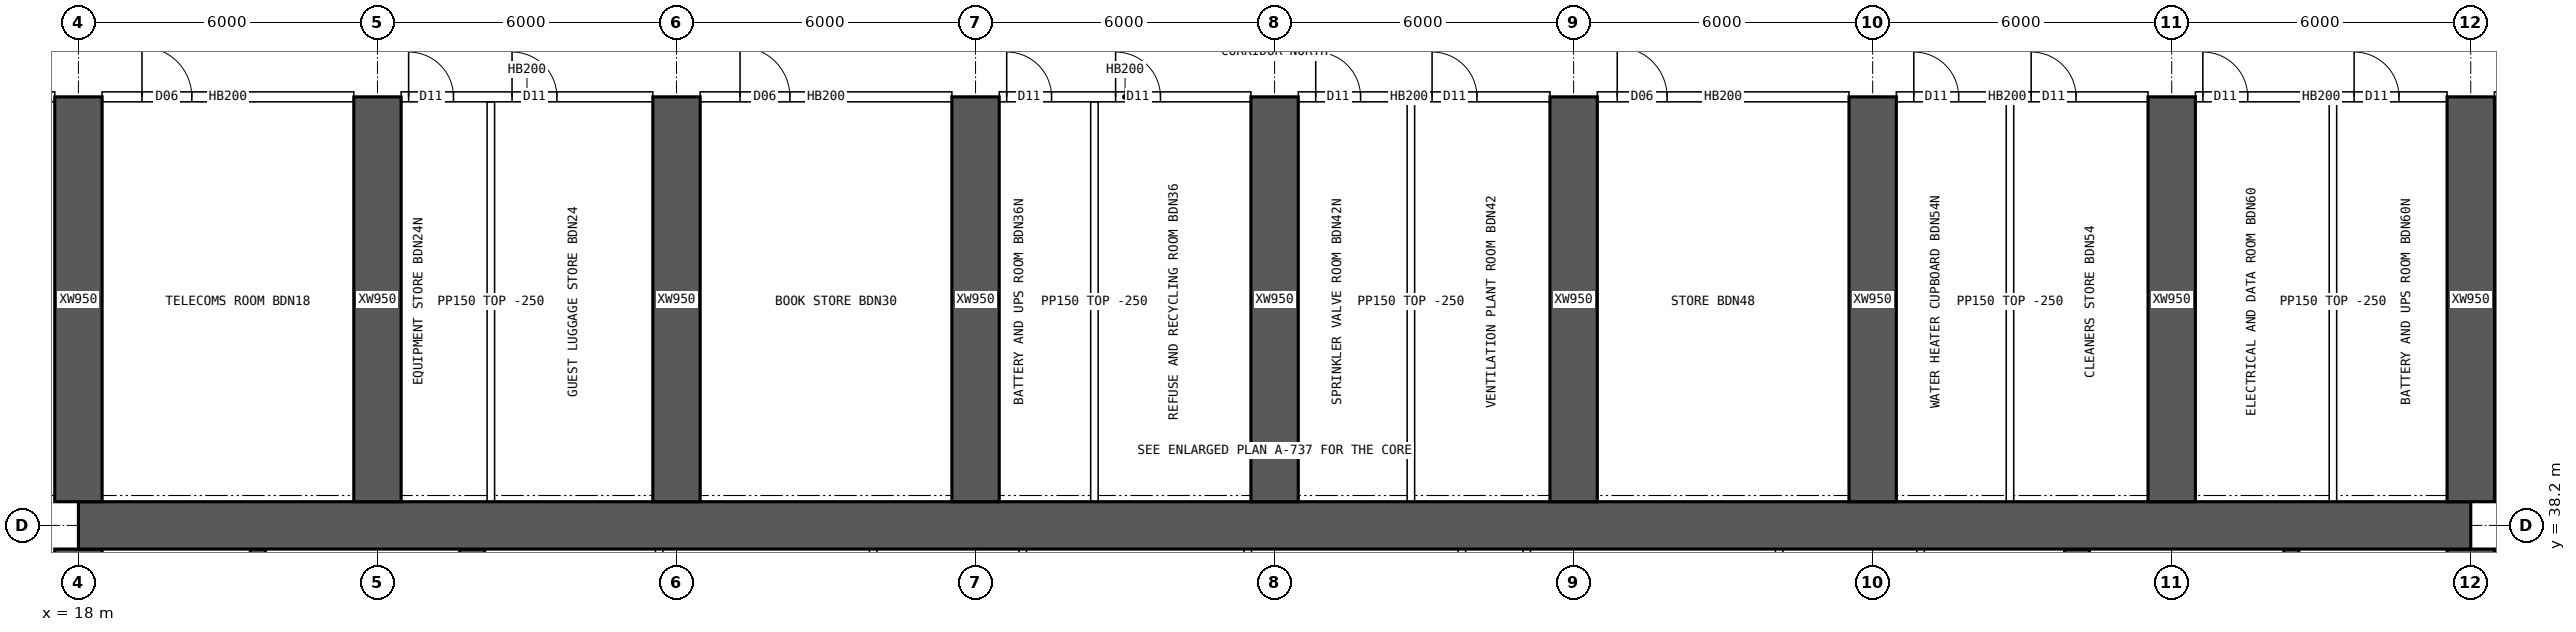
"""IFC4 building model, lengths in metres.
Left out: names, types, materials, properties, quantities, classifications, styles, units other than length and angle.
Written with IfcOpenShell. Run it as: python <this file> out.ifc"""

import sys

from ifc_helpers import new_model, si_unit, direction, frame, frame_2d, origin, place, context, subcontext, project, spatial, rectangle, extrude, element, fill, save


model = new_model("IFC4")
c1 = context("Model", 3, precision=1e-05, world=origin(), true_north=direction((0.0, 1.0)))
c2 = subcontext(c1, "Body", "Model", "MODEL_VIEW")
j1 = project(units=[si_unit("LENGTHUNIT", "METRE"), si_unit("PLANEANGLEUNIT", "RADIAN")], contexts=[c1])
p1 = place(None, origin())
s1 = spatial("IfcSite", under=j1, at=p1, CompositionType="ELEMENT")
p2 = place(p1, origin())
s2 = spatial("IfcBuilding", under=s1, at=p2, CompositionType="ELEMENT")
p3 = place(p2, frame((0.0, 0.0, 140.35)))
s3 = spatial("IfcBuildingStorey", under=s2, at=p3, CompositionType="ELEMENT", Elevation=140.35)
p4 = place(p3, frame((18.0, 38.2, 0.0), z_axis=(0.0, 0.0, 1.0), x_axis=(1.0, 0.0, 0.0)))
e1 = element("IfcWall", 1, at=p4, inside=s3, PredefinedType="SHEAR", context=c2, shape_type="SweptSolid", body=[
    extrude(rectangle(XDim=48.0, YDim=0.95, at=frame_2d((24.0, 0.0))), origin(), (0.0, 0.0, 1.0), 4.5),
])
p5 = place(p3, frame((18.0, 26.275, 0.0), z_axis=(0.0, 0.0, 1.0), x_axis=(0.0, 1.0, 0.0)))
e2 = element("IfcWall", 2, at=p5, inside=s3, PredefinedType="SHEAR", context=c2, shape_type="SweptSolid", body=[
    extrude(rectangle(XDim=11.45, YDim=0.95, at=frame_2d((5.725, 0.0))), origin(), (0.0, 0.0, 1.0), 4.5),
])
p6 = place(p5, frame((5.025, 0.0, 0.0)))
e3 = element("IfcOpeningElement", 3, at=p6, cuts=e2, PredefinedType="OPENING", context=c2, shape_type="SweptSolid", body=[
    extrude(rectangle(XDim=1.2, YDim=2.1, at=frame_2d((0.6, 1.05))), frame((0.0, 0.485, 0.0), z_axis=(0.0, -1.0, 0.0), x_axis=(1.0, 0.0, 0.0)), (0.0, 0.0, 1.0), 0.97),
])
p7 = place(p3, frame((66.0, 26.275, 0.0), z_axis=(0.0, 0.0, 1.0), x_axis=(0.0, 1.0, 0.0)))
e4 = element("IfcWall", 4, at=p7, inside=s3, PredefinedType="SHEAR", context=c2, shape_type="SweptSolid", body=[
    extrude(rectangle(XDim=11.45, YDim=0.95, at=frame_2d((5.725, 0.0))), origin(), (0.0, 0.0, 1.0), 4.5),
])
p8 = place(p7, frame((5.025, 0.0, 0.0)))
e5 = element("IfcOpeningElement", 5, at=p8, cuts=e4, PredefinedType="OPENING", context=c2, shape_type="SweptSolid", body=[
    extrude(rectangle(XDim=1.2, YDim=2.1, at=frame_2d((0.6, 1.05))), frame((0.0, 0.485, 0.0), z_axis=(0.0, -1.0, 0.0), x_axis=(1.0, 0.0, 0.0)), (0.0, 0.0, 1.0), 0.97),
])
for number, where, z_axis, x_axis in (
    (6, (21.6, 34.75, 0.0), (0.0, 0.0, 1.0), (0.0, 1.0, 0.0)),
    (7, (62.4, 34.75, 0.0), (0.0, 0.0, 1.0), (0.0, 1.0, 0.0)),
):
    element("IfcWall", number, at=place(p3, frame(where, z_axis=z_axis, x_axis=x_axis)), inside=s3, PredefinedType="SHEAR", context=c2, shape_type="SweptSolid", body=[
        extrude(rectangle(XDim=2.975, YDim=0.3, at=frame_2d((1.488, 0.0))), origin(), (0.0, 0.0, 1.0), 4.5),
    ])
for number, where, z_axis, x_axis in (
    (8, (25.9, 34.75, 0.0), (0.0, 0.0, 1.0), (0.0, 1.0, 0.0)),
    (9, (58.1, 34.75, 0.0), (0.0, 0.0, 1.0), (0.0, 1.0, 0.0)),
):
    element("IfcWall", number, at=place(p3, frame(where, z_axis=z_axis, x_axis=x_axis)), inside=s3, PredefinedType="SHEAR", context=c2, shape_type="SweptSolid", body=[
        extrude(rectangle(XDim=2.975, YDim=0.5, at=frame_2d((1.488, 0.0))), origin(), (0.0, 0.0, 1.0), 4.5),
    ])
for number, where, z_axis, x_axis in (
    (10, (18.0, 38.675, 0.0), (0.0, 0.0, 1.0), (0.0, 1.0, 0.0)),
    (11, (24.0, 38.675, 0.0), (0.0, 0.0, 1.0), (0.0, 1.0, 0.0)),
    (12, (30.0, 38.675, 0.0), (0.0, 0.0, 1.0), (0.0, 1.0, 0.0)),
    (13, (36.0, 38.675, 0.0), (0.0, 0.0, 1.0), (0.0, 1.0, 0.0)),
    (14, (42.0, 38.675, 0.0), (0.0, 0.0, 1.0), (0.0, 1.0, 0.0)),
    (15, (48.0, 38.675, 0.0), (0.0, 0.0, 1.0), (0.0, 1.0, 0.0)),
    (16, (54.0, 38.675, 0.0), (0.0, 0.0, 1.0), (0.0, 1.0, 0.0)),
    (17, (60.0, 38.675, 0.0), (0.0, 0.0, 1.0), (0.0, 1.0, 0.0)),
    (18, (66.0, 38.675, 0.0), (0.0, 0.0, 1.0), (0.0, 1.0, 0.0)),
):
    element("IfcWall", number, at=place(p3, frame(where, z_axis=z_axis, x_axis=x_axis)), inside=s3, PredefinedType="SHEAR", context=c2, shape_type="SweptSolid", body=[
        extrude(rectangle(XDim=8.125, YDim=0.95, at=frame_2d((4.062, 0.0))), origin(), (0.0, 0.0, 1.0), 4.5),
    ])
for number, where, z_axis, x_axis in (
    (19, (29.651, 34.75, 0.0), (0.0, 0.0, 1.0), (0.0, 1.0, 0.0)),
    (20, (33.946, 34.75, 0.0), (0.0, 0.0, 1.0), (0.0, 1.0, 0.0)),
    (21, (36.946, 34.75, 0.0), (0.0, 0.0, 1.0), (0.0, 1.0, 0.0)),
    (22, (41.463, 34.75, 0.0), (0.0, 0.0, 1.0), (0.0, 1.0, 0.0)),
    (23, (45.758, 34.75, 0.0), (0.0, 0.0, 1.0), (0.0, 1.0, 0.0)),
    (24, (47.058, 34.75, 0.0), (0.0, 0.0, 1.0), (0.0, 1.0, 0.0)),
    (25, (52.124, 34.75, 0.0), (0.0, 0.0, 1.0), (0.0, 1.0, 0.0)),
    (26, (54.961, 34.75, 0.0), (0.0, 0.0, 1.0), (0.0, 1.0, 0.0)),
):
    element("IfcWall", number, at=place(p3, frame(where, z_axis=z_axis, x_axis=x_axis)), inside=s3, PredefinedType="SOLIDWALL", context=c2, shape_type="SweptSolid", body=[
        extrude(rectangle(XDim=2.975, YDim=0.15, at=frame_2d((1.488, 0.0))), origin(), (0.0, 0.0, 1.0), 4.25),
    ])
p9 = place(p3, frame((15.6, 46.8, 0.0), z_axis=(0.0, 0.0, 1.0), x_axis=(1.0, 0.0, 0.0)))
e27 = element("IfcWall", 27, at=p9, inside=s3, PredefinedType="SOLIDWALL", context=c2, shape_type="SweptSolid", body=[
    extrude(rectangle(XDim=1.925, YDim=0.2, at=frame_2d((0.962, 0.0))), origin(), (0.0, 0.0, 1.0), 4.25),
])
p10 = place(p9, frame((0.625, 0.0, 0.0)))
e28 = element("IfcOpeningElement", 28, at=p10, cuts=e27, PredefinedType="OPENING", context=c2, shape_type="SweptSolid", body=[
    extrude(rectangle(XDim=1.2, YDim=2.1, at=frame_2d((0.6, 1.05))), frame((0.0, 0.11, 0.0), z_axis=(0.0, -1.0, 0.0), x_axis=(1.0, 0.0, 0.0)), (0.0, 0.0, 1.0), 0.22),
])
p11 = place(p3, frame((18.475, 46.8, 0.0), z_axis=(0.0, 0.0, 1.0), x_axis=(1.0, 0.0, 0.0)))
e29 = element("IfcWall", 29, at=p11, inside=s3, PredefinedType="SOLIDWALL", context=c2, shape_type="SweptSolid", body=[
    extrude(rectangle(XDim=5.05, YDim=0.2, at=frame_2d((2.525, 0.0))), origin(), (0.0, 0.0, 1.0), 4.25),
])
p12 = place(p11, frame((0.8, 0.0, 0.0)))
e30 = element("IfcOpeningElement", 30, at=p12, cuts=e29, PredefinedType="OPENING", context=c2, shape_type="SweptSolid", body=[
    extrude(rectangle(XDim=1.0, YDim=2.1, at=frame_2d((0.5, 1.05))), frame((0.0, 0.11, 0.0), z_axis=(0.0, -1.0, 0.0), x_axis=(1.0, 0.0, 0.0)), (0.0, 0.0, 1.0), 0.22),
])
p13 = place(p3, frame((24.475, 46.8, 0.0), z_axis=(0.0, 0.0, 1.0), x_axis=(1.0, 0.0, 0.0)))
e31 = element("IfcWall", 31, at=p13, inside=s3, PredefinedType="SOLIDWALL", context=c2, shape_type="SweptSolid", body=[
    extrude(rectangle(XDim=5.05, YDim=0.2, at=frame_2d((2.525, 0.0))), origin(), (0.0, 0.0, 1.0), 4.25),
])
p14 = place(p13, frame((0.15, 0.0, 0.0)))
e32 = element("IfcOpeningElement", 32, at=p14, cuts=e31, PredefinedType="OPENING", context=c2, shape_type="SweptSolid", body=[
    extrude(rectangle(XDim=0.9, YDim=2.1, at=frame_2d((0.45, 1.05))), frame((0.0, 0.11, 0.0), z_axis=(0.0, -1.0, 0.0), x_axis=(1.0, 0.0, 0.0)), (0.0, 0.0, 1.0), 0.22),
])
p15 = place(p13, frame((2.225, 0.0, 0.0)))
e33 = element("IfcOpeningElement", 33, at=p15, cuts=e31, PredefinedType="OPENING", context=c2, shape_type="SweptSolid", body=[
    extrude(rectangle(XDim=0.9, YDim=2.1, at=frame_2d((0.45, 1.05))), frame((0.0, 0.11, 0.0), z_axis=(0.0, -1.0, 0.0), x_axis=(1.0, 0.0, 0.0)), (0.0, 0.0, 1.0), 0.22),
])
p16 = place(p3, frame((30.475, 46.8, 0.0), z_axis=(0.0, 0.0, 1.0), x_axis=(1.0, 0.0, 0.0)))
e34 = element("IfcWall", 34, at=p16, inside=s3, PredefinedType="SOLIDWALL", context=c2, shape_type="SweptSolid", body=[
    extrude(rectangle(XDim=5.05, YDim=0.2, at=frame_2d((2.525, 0.0))), origin(), (0.0, 0.0, 1.0), 4.25),
])
p17 = place(p16, frame((0.8, 0.0, 0.0)))
e35 = element("IfcOpeningElement", 35, at=p17, cuts=e34, PredefinedType="OPENING", context=c2, shape_type="SweptSolid", body=[
    extrude(rectangle(XDim=1.0, YDim=2.1, at=frame_2d((0.5, 1.05))), frame((0.0, 0.11, 0.0), z_axis=(0.0, -1.0, 0.0), x_axis=(1.0, 0.0, 0.0)), (0.0, 0.0, 1.0), 0.22),
])
p18 = place(p3, frame((36.475, 46.8, 0.0), z_axis=(0.0, 0.0, 1.0), x_axis=(1.0, 0.0, 0.0)))
e36 = element("IfcWall", 36, at=p18, inside=s3, PredefinedType="SOLIDWALL", context=c2, shape_type="SweptSolid", body=[
    extrude(rectangle(XDim=5.05, YDim=0.2, at=frame_2d((2.525, 0.0))), origin(), (0.0, 0.0, 1.0), 4.25),
])
p19 = place(p18, frame((0.15, 0.0, 0.0)))
e37 = element("IfcOpeningElement", 37, at=p19, cuts=e36, PredefinedType="OPENING", context=c2, shape_type="SweptSolid", body=[
    extrude(rectangle(XDim=0.9, YDim=2.1, at=frame_2d((0.45, 1.05))), frame((0.0, 0.11, 0.0), z_axis=(0.0, -1.0, 0.0), x_axis=(1.0, 0.0, 0.0)), (0.0, 0.0, 1.0), 0.22),
])
p20 = place(p18, frame((2.335, 0.0, 0.0)))
e38 = element("IfcOpeningElement", 38, at=p20, cuts=e36, PredefinedType="OPENING", context=c2, shape_type="SweptSolid", body=[
    extrude(rectangle(XDim=0.9, YDim=2.1, at=frame_2d((0.45, 1.05))), frame((0.0, 0.11, 0.0), z_axis=(0.0, -1.0, 0.0), x_axis=(1.0, 0.0, 0.0)), (0.0, 0.0, 1.0), 0.22),
])
p21 = place(p3, frame((42.475, 46.8, 0.0), z_axis=(0.0, 0.0, 1.0), x_axis=(1.0, 0.0, 0.0)))
e39 = element("IfcWall", 39, at=p21, inside=s3, PredefinedType="SOLIDWALL", context=c2, shape_type="SweptSolid", body=[
    extrude(rectangle(XDim=5.05, YDim=0.2, at=frame_2d((2.525, 0.0))), origin(), (0.0, 0.0, 1.0), 4.25),
])
p22 = place(p21, frame((0.35, 0.0, 0.0)))
e40 = element("IfcOpeningElement", 40, at=p22, cuts=e39, PredefinedType="OPENING", context=c2, shape_type="SweptSolid", body=[
    extrude(rectangle(XDim=0.9, YDim=2.1, at=frame_2d((0.45, 1.05))), frame((0.0, 0.11, 0.0), z_axis=(0.0, -1.0, 0.0), x_axis=(1.0, 0.0, 0.0)), (0.0, 0.0, 1.0), 0.22),
])
p23 = place(p21, frame((2.685, 0.0, 0.0)))
e41 = element("IfcOpeningElement", 41, at=p23, cuts=e39, PredefinedType="OPENING", context=c2, shape_type="SweptSolid", body=[
    extrude(rectangle(XDim=0.9, YDim=2.1, at=frame_2d((0.45, 1.05))), frame((0.0, 0.11, 0.0), z_axis=(0.0, -1.0, 0.0), x_axis=(1.0, 0.0, 0.0)), (0.0, 0.0, 1.0), 0.22),
])
p24 = place(p3, frame((48.475, 46.8, 0.0), z_axis=(0.0, 0.0, 1.0), x_axis=(1.0, 0.0, 0.0)))
e42 = element("IfcWall", 42, at=p24, inside=s3, PredefinedType="SOLIDWALL", context=c2, shape_type="SweptSolid", body=[
    extrude(rectangle(XDim=5.05, YDim=0.2, at=frame_2d((2.525, 0.0))), origin(), (0.0, 0.0, 1.0), 4.25),
])
p25 = place(p24, frame((0.4, 0.0, 0.0)))
e43 = element("IfcOpeningElement", 43, at=p25, cuts=e42, PredefinedType="OPENING", context=c2, shape_type="SweptSolid", body=[
    extrude(rectangle(XDim=1.0, YDim=2.1, at=frame_2d((0.5, 1.05))), frame((0.0, 0.11, 0.0), z_axis=(0.0, -1.0, 0.0), x_axis=(1.0, 0.0, 0.0)), (0.0, 0.0, 1.0), 0.22),
])
p26 = place(p3, frame((54.475, 46.8, 0.0), z_axis=(0.0, 0.0, 1.0), x_axis=(1.0, 0.0, 0.0)))
e44 = element("IfcWall", 44, at=p26, inside=s3, PredefinedType="SOLIDWALL", context=c2, shape_type="SweptSolid", body=[
    extrude(rectangle(XDim=5.05, YDim=0.2, at=frame_2d((2.525, 0.0))), origin(), (0.0, 0.0, 1.0), 4.25),
])
p27 = place(p26, frame((0.35, 0.0, 0.0)))
e45 = element("IfcOpeningElement", 45, at=p27, cuts=e44, PredefinedType="OPENING", context=c2, shape_type="SweptSolid", body=[
    extrude(rectangle(XDim=0.9, YDim=2.1, at=frame_2d((0.45, 1.05))), frame((0.0, 0.11, 0.0), z_axis=(0.0, -1.0, 0.0), x_axis=(1.0, 0.0, 0.0)), (0.0, 0.0, 1.0), 0.22),
])
p28 = place(p26, frame((2.705, 0.0, 0.0)))
e46 = element("IfcOpeningElement", 46, at=p28, cuts=e44, PredefinedType="OPENING", context=c2, shape_type="SweptSolid", body=[
    extrude(rectangle(XDim=0.9, YDim=2.1, at=frame_2d((0.45, 1.05))), frame((0.0, 0.11, 0.0), z_axis=(0.0, -1.0, 0.0), x_axis=(1.0, 0.0, 0.0)), (0.0, 0.0, 1.0), 0.22),
])
p29 = place(p3, frame((60.475, 46.8, 0.0), z_axis=(0.0, 0.0, 1.0), x_axis=(1.0, 0.0, 0.0)))
e47 = element("IfcWall", 47, at=p29, inside=s3, PredefinedType="SOLIDWALL", context=c2, shape_type="SweptSolid", body=[
    extrude(rectangle(XDim=5.05, YDim=0.2, at=frame_2d((2.525, 0.0))), origin(), (0.0, 0.0, 1.0), 4.25),
])
p30 = place(p29, frame((0.15, 0.0, 0.0)))
e48 = element("IfcOpeningElement", 48, at=p30, cuts=e47, PredefinedType="OPENING", context=c2, shape_type="SweptSolid", body=[
    extrude(rectangle(XDim=0.9, YDim=2.1, at=frame_2d((0.45, 1.05))), frame((0.0, 0.11, 0.0), z_axis=(0.0, -1.0, 0.0), x_axis=(1.0, 0.0, 0.0)), (0.0, 0.0, 1.0), 0.22),
])
p31 = place(p29, frame((3.185, 0.0, 0.0)))
e49 = element("IfcOpeningElement", 49, at=p31, cuts=e47, PredefinedType="OPENING", context=c2, shape_type="SweptSolid", body=[
    extrude(rectangle(XDim=0.9, YDim=2.1, at=frame_2d((0.45, 1.05))), frame((0.0, 0.11, 0.0), z_axis=(0.0, -1.0, 0.0), x_axis=(1.0, 0.0, 0.0)), (0.0, 0.0, 1.0), 0.22),
])
p32 = place(p3, frame((66.475, 46.8, 0.0), z_axis=(0.0, 0.0, 1.0), x_axis=(1.0, 0.0, 0.0)))
e50 = element("IfcWall", 50, at=p32, inside=s3, PredefinedType="SOLIDWALL", context=c2, shape_type="SweptSolid", body=[
    extrude(rectangle(XDim=1.925, YDim=0.2, at=frame_2d((0.962, 0.0))), origin(), (0.0, 0.0, 1.0), 4.25),
])
p33 = place(p32, frame((0.05, 0.0, 0.0)))
e51 = element("IfcOpeningElement", 51, at=p33, cuts=e50, PredefinedType="OPENING", context=c2, shape_type="SweptSolid", body=[
    extrude(rectangle(XDim=1.2, YDim=2.1, at=frame_2d((0.6, 1.05))), frame((0.0, 0.11, 0.0), z_axis=(0.0, -1.0, 0.0), x_axis=(1.0, 0.0, 0.0)), (0.0, 0.0, 1.0), 0.22),
])
for number, where, z_axis, x_axis in (
    (52, (26.275, 38.675, 0.0), (0.0, 0.0, 1.0), (0.0, 1.0, 0.0)),
    (53, (38.385, 38.675, 0.0), (0.0, 0.0, 1.0), (0.0, 1.0, 0.0)),
    (54, (44.735, 38.675, 0.0), (0.0, 0.0, 1.0), (0.0, 1.0, 0.0)),
    (55, (56.755, 38.675, 0.0), (0.0, 0.0, 1.0), (0.0, 1.0, 0.0)),
    (56, (63.235, 38.675, 0.0), (0.0, 0.0, 1.0), (0.0, 1.0, 0.0)),
):
    element("IfcWall", number, at=place(p3, frame(where, z_axis=z_axis, x_axis=x_axis)), inside=s3, PredefinedType="PARTITIONING", context=c2, shape_type="SweptSolid", body=[
        extrude(rectangle(XDim=8.025, YDim=0.15, at=frame_2d((4.012, 0.0))), origin(), (0.0, 0.0, 1.0), 4.25),
    ])
p34 = place(p12, origin())
e57 = element("IfcDoor", 57, at=p34, inside=s3, OperationType="SINGLE_SWING_LEFT", PredefinedType="DOOR", context=c2, shape_type="SweptSolid", body=[
    extrude(rectangle(XDim=1.0, YDim=2.1, at=frame_2d((0.5, 1.05))), frame((0.0, 0.025, 0.0), z_axis=(0.0, -1.0, 0.0), x_axis=(1.0, 0.0, 0.0)), (0.0, 0.0, 1.0), 0.05),
])
fill(e30, e57)
p35 = place(p14, origin())
e58 = element("IfcDoor", 58, at=p35, inside=s3, OperationType="SINGLE_SWING_LEFT", PredefinedType="DOOR", context=c2, shape_type="SweptSolid", body=[
    extrude(rectangle(XDim=0.9, YDim=2.1, at=frame_2d((0.45, 1.05))), frame((0.0, 0.025, 0.0), z_axis=(0.0, -1.0, 0.0), x_axis=(1.0, 0.0, 0.0)), (0.0, 0.0, 1.0), 0.05),
])
fill(e32, e58)
p36 = place(p15, origin())
e59 = element("IfcDoor", 59, at=p36, inside=s3, OperationType="SINGLE_SWING_LEFT", PredefinedType="DOOR", context=c2, shape_type="SweptSolid", body=[
    extrude(rectangle(XDim=0.9, YDim=2.1, at=frame_2d((0.45, 1.05))), frame((0.0, 0.025, 0.0), z_axis=(0.0, -1.0, 0.0), x_axis=(1.0, 0.0, 0.0)), (0.0, 0.0, 1.0), 0.05),
])
fill(e33, e59)
p37 = place(p17, origin())
e60 = element("IfcDoor", 60, at=p37, inside=s3, OperationType="SINGLE_SWING_LEFT", PredefinedType="DOOR", context=c2, shape_type="SweptSolid", body=[
    extrude(rectangle(XDim=1.0, YDim=2.1, at=frame_2d((0.5, 1.05))), frame((0.0, 0.025, 0.0), z_axis=(0.0, -1.0, 0.0), x_axis=(1.0, 0.0, 0.0)), (0.0, 0.0, 1.0), 0.05),
])
fill(e35, e60)
p38 = place(p19, origin())
e61 = element("IfcDoor", 61, at=p38, inside=s3, OperationType="SINGLE_SWING_LEFT", PredefinedType="DOOR", context=c2, shape_type="SweptSolid", body=[
    extrude(rectangle(XDim=0.9, YDim=2.1, at=frame_2d((0.45, 1.05))), frame((0.0, 0.025, 0.0), z_axis=(0.0, -1.0, 0.0), x_axis=(1.0, 0.0, 0.0)), (0.0, 0.0, 1.0), 0.05),
])
fill(e37, e61)
p39 = place(p20, origin())
e62 = element("IfcDoor", 62, at=p39, inside=s3, OperationType="SINGLE_SWING_LEFT", PredefinedType="DOOR", context=c2, shape_type="SweptSolid", body=[
    extrude(rectangle(XDim=0.9, YDim=2.1, at=frame_2d((0.45, 1.05))), frame((0.0, 0.025, 0.0), z_axis=(0.0, -1.0, 0.0), x_axis=(1.0, 0.0, 0.0)), (0.0, 0.0, 1.0), 0.05),
])
fill(e38, e62)
p40 = place(p22, origin())
e63 = element("IfcDoor", 63, at=p40, inside=s3, OperationType="SINGLE_SWING_LEFT", PredefinedType="DOOR", context=c2, shape_type="SweptSolid", body=[
    extrude(rectangle(XDim=0.9, YDim=2.1, at=frame_2d((0.45, 1.05))), frame((0.0, 0.025, 0.0), z_axis=(0.0, -1.0, 0.0), x_axis=(1.0, 0.0, 0.0)), (0.0, 0.0, 1.0), 0.05),
])
fill(e40, e63)
p41 = place(p23, origin())
e64 = element("IfcDoor", 64, at=p41, inside=s3, OperationType="SINGLE_SWING_LEFT", PredefinedType="DOOR", context=c2, shape_type="SweptSolid", body=[
    extrude(rectangle(XDim=0.9, YDim=2.1, at=frame_2d((0.45, 1.05))), frame((0.0, 0.025, 0.0), z_axis=(0.0, -1.0, 0.0), x_axis=(1.0, 0.0, 0.0)), (0.0, 0.0, 1.0), 0.05),
])
fill(e41, e64)
p42 = place(p25, origin())
e65 = element("IfcDoor", 65, at=p42, inside=s3, OperationType="SINGLE_SWING_LEFT", PredefinedType="DOOR", context=c2, shape_type="SweptSolid", body=[
    extrude(rectangle(XDim=1.0, YDim=2.1, at=frame_2d((0.5, 1.05))), frame((0.0, 0.025, 0.0), z_axis=(0.0, -1.0, 0.0), x_axis=(1.0, 0.0, 0.0)), (0.0, 0.0, 1.0), 0.05),
])
fill(e43, e65)
p43 = place(p27, origin())
e66 = element("IfcDoor", 66, at=p43, inside=s3, OperationType="SINGLE_SWING_LEFT", PredefinedType="DOOR", context=c2, shape_type="SweptSolid", body=[
    extrude(rectangle(XDim=0.9, YDim=2.1, at=frame_2d((0.45, 1.05))), frame((0.0, 0.025, 0.0), z_axis=(0.0, -1.0, 0.0), x_axis=(1.0, 0.0, 0.0)), (0.0, 0.0, 1.0), 0.05),
])
fill(e45, e66)
p44 = place(p28, origin())
e67 = element("IfcDoor", 67, at=p44, inside=s3, OperationType="SINGLE_SWING_LEFT", PredefinedType="DOOR", context=c2, shape_type="SweptSolid", body=[
    extrude(rectangle(XDim=0.9, YDim=2.1, at=frame_2d((0.45, 1.05))), frame((0.0, 0.025, 0.0), z_axis=(0.0, -1.0, 0.0), x_axis=(1.0, 0.0, 0.0)), (0.0, 0.0, 1.0), 0.05),
])
fill(e46, e67)
p45 = place(p30, origin())
e68 = element("IfcDoor", 68, at=p45, inside=s3, OperationType="SINGLE_SWING_LEFT", PredefinedType="DOOR", context=c2, shape_type="SweptSolid", body=[
    extrude(rectangle(XDim=0.9, YDim=2.1, at=frame_2d((0.45, 1.05))), frame((0.0, 0.025, 0.0), z_axis=(0.0, -1.0, 0.0), x_axis=(1.0, 0.0, 0.0)), (0.0, 0.0, 1.0), 0.05),
])
fill(e48, e68)
p46 = place(p31, origin())
e69 = element("IfcDoor", 69, at=p46, inside=s3, OperationType="SINGLE_SWING_LEFT", PredefinedType="DOOR", context=c2, shape_type="SweptSolid", body=[
    extrude(rectangle(XDim=0.9, YDim=2.1, at=frame_2d((0.45, 1.05))), frame((0.0, 0.025, 0.0), z_axis=(0.0, -1.0, 0.0), x_axis=(1.0, 0.0, 0.0)), (0.0, 0.0, 1.0), 0.05),
])
fill(e49, e69)
save(model, sys.argv[1])
